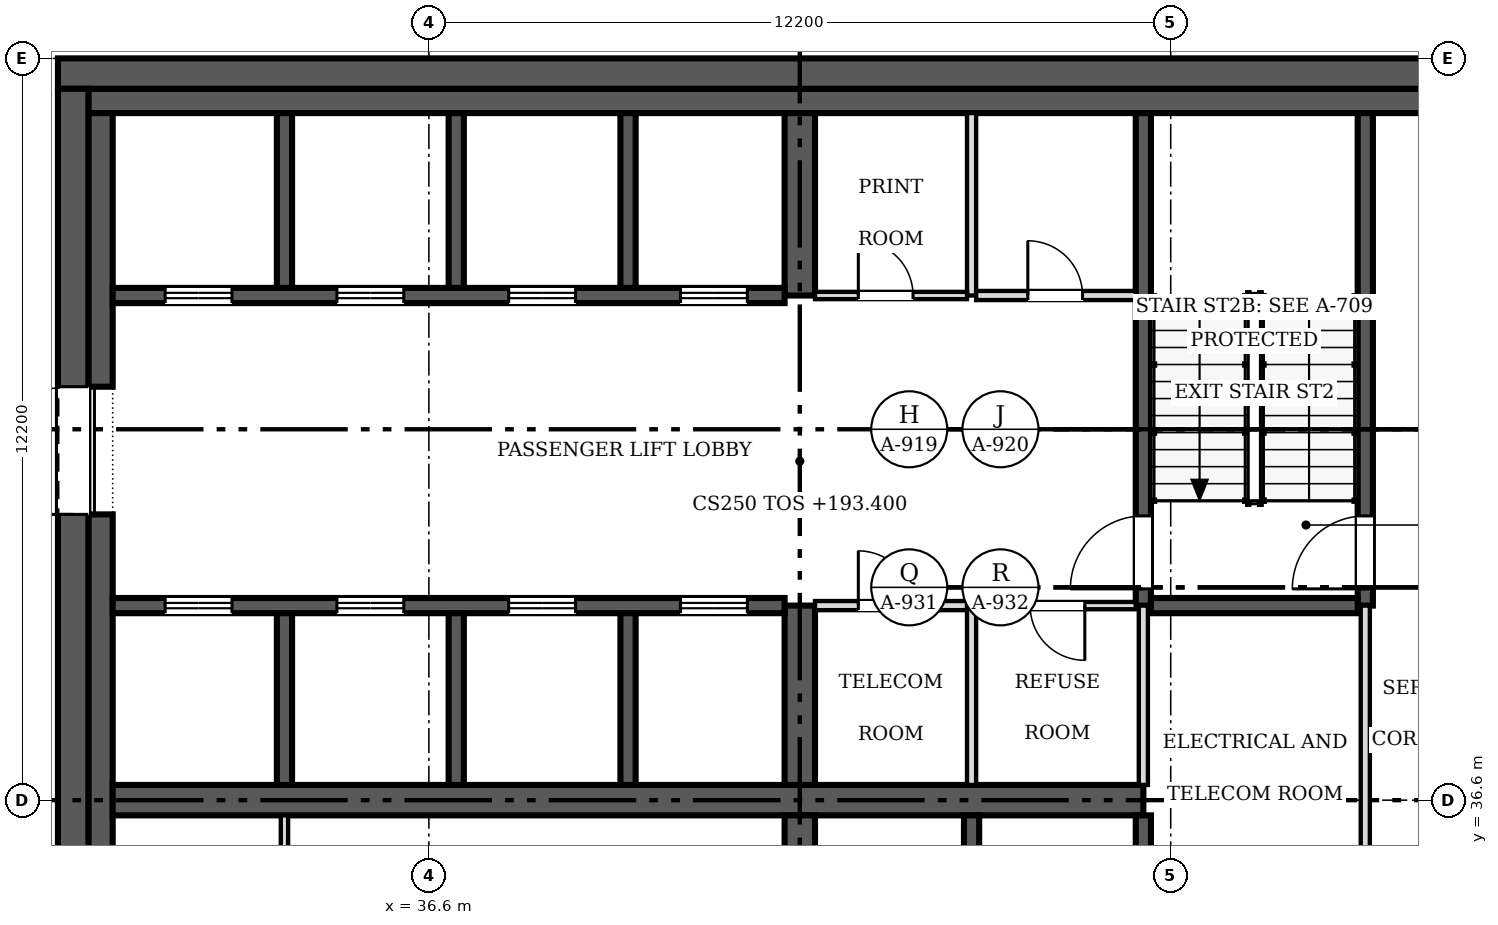
"""IFC4 building model, lengths in metres.
Left out: names, types, materials, properties, quantities, classifications, styles, units other than length and angle.
Written with IfcOpenShell. Run it as: python <this file> out.ifc"""

import sys

from ifc_helpers import new_model, si_unit, direction, frame, frame_2d, origin, place, context, subcontext, project, spatial, rectangle, extrude, source, transform, mapped, element, fill, save


model = new_model("IFC4")
c1 = context("Model", 3, precision=1e-05, world=origin(), true_north=direction((0.0, 1.0)))
c2 = subcontext(c1, "Body", "Model", "MODEL_VIEW")
j1 = project(units=[si_unit("LENGTHUNIT", "METRE"), si_unit("PLANEANGLEUNIT", "RADIAN")], contexts=[c1])
p1 = place(None, origin())
s1 = spatial("IfcSite", under=j1, at=p1, CompositionType="ELEMENT")
p2 = place(p1, origin())
s2 = spatial("IfcBuilding", under=s1, at=p2, CompositionType="ELEMENT")
p3 = place(p2, frame((0.0, 0.0, 193.4)))
s3 = spatial("IfcBuildingStorey", under=s2, at=p3, CompositionType="ELEMENT", Elevation=193.4)
p4 = place(p3, frame((30.75, 24.9, 0.0), z_axis=(0.0, 0.0, 1.0), x_axis=(0.0, 1.0, 0.0)))
e1 = element("IfcWall", 1, at=p4, inside=s3, PredefinedType="SHEAR", context=c2, shape_type="SweptSolid", body=[
    extrude(rectangle(XDim=23.4, YDim=0.5, at=frame_2d((11.7, 0.0))), origin(), (0.0, 0.0, 1.0), 4.5),
])
m1 = source(origin(), c2, "Body", "SweptSolid", [
    extrude(rectangle(XDim=2.1, YDim=2.4, at=frame_2d((1.05, 1.2))), frame((0.0, 0.26, 0.0), z_axis=(0.0, -1.0, 0.0), x_axis=(1.0, 0.0, 0.0)), (0.0, 0.0, 1.0), 0.52),
])
p5 = place(p4, frame((4.9, 0.0, 0.0)))
e2 = element("IfcOpeningElement", 2, at=p5, cuts=e1, PredefinedType="OPENING", context=c2, shape_type="MappedRepresentation", body=[
    mapped(m1, transform((0.0, 0.0, 0.0), scale=1.0)),
])
p6 = place(p4, frame((16.4, 0.0, 0.0)))
e3 = element("IfcOpeningElement", 3, at=p6, cuts=e1, PredefinedType="OPENING", context=c2, shape_type="MappedRepresentation", body=[
    mapped(m1, transform((0.0, 0.0, 0.0), scale=1.0)),
])
p7 = place(p3, frame((30.5, 48.55, 0.0), z_axis=(0.0, 0.0, 1.0), x_axis=(1.0, 0.0, 0.0)))
e4 = element("IfcWall", 4, at=p7, inside=s3, PredefinedType="SHEAR", context=c2, shape_type="SweptSolid", body=[
    extrude(rectangle(XDim=24.4, YDim=0.5, at=frame_2d((12.2, 0.0))), origin(), (0.0, 0.0, 1.0), 4.5),
])
p8 = place(p3, frame((31.0, 48.1, 0.0), z_axis=(0.0, 0.0, 1.0), x_axis=(1.0, 0.0, 0.0)))
e5 = element("IfcWall", 5, at=p8, inside=s3, PredefinedType="SOLIDWALL", context=c2, shape_type="SweptSolid", body=[
    extrude(rectangle(XDim=23.4, YDim=0.4, at=frame_2d((11.7, 0.0))), origin(), (0.0, 0.0, 1.0), 4.5),
])
p9 = place(p3, frame((31.2, 31.9, 0.0), z_axis=(0.0, 0.0, 1.0), x_axis=(0.0, 1.0, 0.0)))
e6 = element("IfcWall", 6, at=p9, inside=s3, PredefinedType="SOLIDWALL", context=c2, shape_type="SweptSolid", body=[
    extrude(rectangle(XDim=9.4, YDim=0.4, at=frame_2d((4.7, 0.0))), origin(), (0.0, 0.0, 1.0), 4.5),
])
p10 = place(p3, frame((31.2, 43.4, 0.0), z_axis=(0.0, 0.0, 1.0), x_axis=(0.0, 1.0, 0.0)))
e7 = element("IfcWall", 7, at=p10, inside=s3, PredefinedType="SOLIDWALL", context=c2, shape_type="SweptSolid", body=[
    extrude(rectangle(XDim=4.5, YDim=0.4, at=frame_2d((2.25, 0.0))), origin(), (0.0, 0.0, 1.0), 4.5),
])
p11 = place(p3, frame((31.4, 36.6, 0.0), z_axis=(0.0, 0.0, 1.0), x_axis=(1.0, 0.0, 0.0)))
e8 = element("IfcWall", 8, at=p11, inside=s3, PredefinedType="SHEAR", context=c2, shape_type="SweptSolid", body=[
    extrude(rectangle(XDim=16.95, YDim=0.5, at=frame_2d((8.475, 0.0))), origin(), (0.0, 0.0, 1.0), 4.5),
])
p12 = place(p3, frame((42.7, 36.35, 0.0), z_axis=(0.0, 0.0, 1.0), x_axis=(0.0, -1.0, 0.0)))
e9 = element("IfcWall", 9, at=p12, inside=s3, PredefinedType="SHEAR", context=c2, shape_type="SweptSolid", body=[
    extrude(rectangle(XDim=11.05, YDim=0.5, at=frame_2d((5.525, 0.0))), origin(), (0.0, 0.0, 1.0), 4.5),
])
m2 = source(origin(), c2, "Body", "SweptSolid", [
    extrude(rectangle(XDim=0.9, YDim=2.1, at=frame_2d((0.45, 1.05))), frame((0.0, 0.26, 0.0), z_axis=(0.0, -1.0, 0.0), x_axis=(1.0, 0.0, 0.0)), (0.0, 0.0, 1.0), 0.52),
])
p13 = place(p12, frame((6.5, 0.0, 0.0)))
e10 = element("IfcOpeningElement", 10, at=p13, cuts=e9, PredefinedType="OPENING", context=c2, shape_type="MappedRepresentation", body=[
    mapped(m2, transform((0.0, 0.0, 0.0), scale=1.0)),
])
m3 = source(origin(), c2, "Body", "SweptSolid", [
    extrude(rectangle(XDim=1.1, YDim=2.1, at=frame_2d((0.55, 1.05))), frame((0.0, 0.26, 0.0), z_axis=(0.0, -1.0, 0.0), x_axis=(1.0, 0.0, 0.0)), (0.0, 0.0, 1.0), 0.52),
])
p14 = place(p12, frame((3.8, 0.0, 0.0)))
e11 = element("IfcOpeningElement", 11, at=p14, cuts=e9, PredefinedType="OPENING", context=c2, shape_type="MappedRepresentation", body=[
    mapped(m3, transform((0.0, 0.0, 0.0), scale=1.0)),
])
p15 = place(p3, frame((42.7, 36.85, 0.0), z_axis=(0.0, 0.0, 1.0), x_axis=(0.0, 1.0, 0.0)))
e12 = element("IfcWall", 12, at=p15, inside=s3, PredefinedType="SHEAR", context=c2, shape_type="SweptSolid", body=[
    extrude(rectangle(XDim=2.95, YDim=0.5, at=frame_2d((1.475, 0.0))), origin(), (0.0, 0.0, 1.0), 4.5),
])
p16 = place(p3, frame((42.7, 44.9, 0.0), z_axis=(0.0, 0.0, 1.0), x_axis=(0.0, 1.0, 0.0)))
e13 = element("IfcWall", 13, at=p16, inside=s3, PredefinedType="SHEAR", context=c2, shape_type="SweptSolid", body=[
    extrude(rectangle(XDim=3.0, YDim=0.5, at=frame_2d((1.5, 0.0))), origin(), (0.0, 0.0, 1.0), 4.5),
])
p17 = place(p3, frame((31.4, 39.8, 0.0), z_axis=(0.0, 0.0, 1.0), x_axis=(1.0, 0.0, 0.0)))
e14 = element("IfcWall", 14, at=p17, inside=s3, PredefinedType="SOLIDWALL", context=c2, shape_type="SweptSolid", body=[
    extrude(rectangle(XDim=11.05, YDim=0.25, at=frame_2d((5.525, 0.0))), origin(), (0.0, 0.0, 1.0), 4.5),
])
m4 = source(origin(), c2, "Body", "SweptSolid", [
    extrude(rectangle(XDim=1.1, YDim=2.1, at=frame_2d((0.55, 1.05))), frame((0.0, 0.135, 0.0), z_axis=(0.0, -1.0, 0.0), x_axis=(1.0, 0.0, 0.0)), (0.0, 0.0, 1.0), 0.27),
])
p18 = place(p17, frame((0.863, 0.0, 0.0)))
e15 = element("IfcOpeningElement", 15, at=p18, cuts=e14, PredefinedType="OPENING", context=c2, shape_type="MappedRepresentation", body=[
    mapped(m4, transform((0.0, 0.0, 0.0), scale=1.0)),
])
p19 = place(p17, frame((3.688, 0.0, 0.0)))
e16 = element("IfcOpeningElement", 16, at=p19, cuts=e14, PredefinedType="OPENING", context=c2, shape_type="MappedRepresentation", body=[
    mapped(m4, transform((0.0, 0.0, 0.0), scale=1.0)),
])
p20 = place(p17, frame((6.512, 0.0, 0.0)))
e17 = element("IfcOpeningElement", 17, at=p20, cuts=e14, PredefinedType="OPENING", context=c2, shape_type="MappedRepresentation", body=[
    mapped(m4, transform((0.0, 0.0, 0.0), scale=1.0)),
])
p21 = place(p17, frame((9.337, 0.0, 0.0)))
e18 = element("IfcOpeningElement", 18, at=p21, cuts=e14, PredefinedType="OPENING", context=c2, shape_type="MappedRepresentation", body=[
    mapped(m4, transform((0.0, 0.0, 0.0), scale=1.0)),
])
p22 = place(p3, frame((42.45, 44.9, 0.0), z_axis=(0.0, 0.0, 1.0), x_axis=(-1.0, 0.0, 0.0)))
e19 = element("IfcWall", 19, at=p22, inside=s3, PredefinedType="SOLIDWALL", context=c2, shape_type="SweptSolid", body=[
    extrude(rectangle(XDim=11.05, YDim=0.25, at=frame_2d((5.525, 0.0))), origin(), (0.0, 0.0, 1.0), 4.5),
])
p23 = place(p22, frame((9.087, 0.0, 0.0)))
e20 = element("IfcOpeningElement", 20, at=p23, cuts=e19, PredefinedType="OPENING", context=c2, shape_type="MappedRepresentation", body=[
    mapped(m4, transform((0.0, 0.0, 0.0), scale=1.0)),
])
p24 = place(p22, frame((6.262, 0.0, 0.0)))
e21 = element("IfcOpeningElement", 21, at=p24, cuts=e19, PredefinedType="OPENING", context=c2, shape_type="MappedRepresentation", body=[
    mapped(m4, transform((0.0, 0.0, 0.0), scale=1.0)),
])
p25 = place(p22, frame((3.438, 0.0, 0.0)))
e22 = element("IfcOpeningElement", 22, at=p25, cuts=e19, PredefinedType="OPENING", context=c2, shape_type="MappedRepresentation", body=[
    mapped(m4, transform((0.0, 0.0, 0.0), scale=1.0)),
])
p26 = place(p22, frame((0.613, 0.0, 0.0)))
e23 = element("IfcOpeningElement", 23, at=p26, cuts=e19, PredefinedType="OPENING", context=c2, shape_type="MappedRepresentation", body=[
    mapped(m4, transform((0.0, 0.0, 0.0), scale=1.0)),
])
p27 = place(p3, frame((48.35, 36.35, 0.0), z_axis=(0.0, 0.0, 1.0), x_axis=(0.0, -1.0, 0.0)))
e24 = element("IfcWall", 24, at=p27, inside=s3, PredefinedType="SOLIDWALL", context=c2, shape_type="SweptSolid", body=[
    extrude(rectangle(XDim=11.05, YDim=0.25, at=frame_2d((5.525, 0.0))), origin(), (0.0, 0.0, 1.0), 4.5),
])
m5 = source(origin(), c2, "Body", "SweptSolid", [
    extrude(rectangle(XDim=1.2, YDim=2.1, at=frame_2d((0.6, 1.05))), frame((0.0, 0.135, 0.0), z_axis=(0.0, -1.0, 0.0), x_axis=(1.0, 0.0, 0.0)), (0.0, 0.0, 1.0), 0.27),
])
p28 = place(p27, frame((3.225, 0.0, 0.0)))
e25 = element("IfcOpeningElement", 25, at=p28, cuts=e24, PredefinedType="OPENING", context=c2, shape_type="MappedRepresentation", body=[
    mapped(m5, transform((0.0, 0.0, 0.0), scale=1.0)),
])
p29 = place(p3, frame((48.35, 47.9, 0.0), z_axis=(0.0, 0.0, 1.0), x_axis=(0.0, -1.0, 0.0)))
e26 = element("IfcWall", 26, at=p29, inside=s3, PredefinedType="SOLIDWALL", context=c2, shape_type="SweptSolid", body=[
    extrude(rectangle(XDim=8.1, YDim=0.25, at=frame_2d((4.05, 0.0))), origin(), (0.0, 0.0, 1.0), 4.5),
])
p30 = place(p29, frame((6.625, 0.0, 0.0)))
e27 = element("IfcOpeningElement", 27, at=p30, cuts=e26, PredefinedType="OPENING", context=c2, shape_type="MappedRepresentation", body=[
    mapped(m5, transform((0.0, 0.0, 0.0), scale=1.0)),
])
p31 = place(p3, frame((52.0, 39.8, 0.0), z_axis=(0.0, 0.0, 1.0), x_axis=(0.0, 1.0, 0.0)))
e28 = element("IfcWall", 28, at=p31, inside=s3, PredefinedType="SOLIDWALL", context=c2, shape_type="SweptSolid", body=[
    extrude(rectangle(XDim=8.1, YDim=0.25, at=frame_2d((4.05, 0.0))), origin(), (0.0, 0.0, 1.0), 4.5),
])
p32 = place(p31, frame((0.275, 0.0, 0.0)))
e29 = element("IfcOpeningElement", 29, at=p32, cuts=e28, PredefinedType="OPENING", context=c2, shape_type="MappedRepresentation", body=[
    mapped(m5, transform((0.0, 0.0, 0.0), scale=1.0)),
])
p33 = place(p3, frame((48.475, 39.8, 0.0), z_axis=(0.0, 0.0, 1.0), x_axis=(1.0, 0.0, 0.0)))
e30 = element("IfcWall", 30, at=p33, inside=s3, PredefinedType="SOLIDWALL", context=c2, shape_type="SweptSolid", body=[
    extrude(rectangle(XDim=3.4, YDim=0.25, at=frame_2d((1.7, 0.0))), origin(), (0.0, 0.0, 1.0), 4.5),
])
for number, where, z_axis, x_axis in (
    (31, (34.225, 36.85, 0.0), (0.0, 0.0, 1.0), (0.0, 1.0, 0.0)),
    (32, (37.05, 36.85, 0.0), (0.0, 0.0, 1.0), (0.0, 1.0, 0.0)),
    (33, (39.875, 36.85, 0.0), (0.0, 0.0, 1.0), (0.0, 1.0, 0.0)),
):
    element("IfcWall", number, at=place(p3, frame(where, z_axis=z_axis, x_axis=x_axis)), inside=s3, PredefinedType="SOLIDWALL", context=c2, shape_type="SweptSolid", body=[
        extrude(rectangle(XDim=2.825, YDim=0.25, at=frame_2d((1.413, 0.0))), origin(), (0.0, 0.0, 1.0), 4.5),
    ])
p34 = place(p3, frame((45.525, 33.525, 0.0), z_axis=(0.0, 0.0, 1.0), x_axis=(0.0, 1.0, 0.0)))
e34 = element("IfcWall", 34, at=p34, inside=s3, PredefinedType="SOLIDWALL", context=c2, shape_type="SweptSolid", body=[
    extrude(rectangle(XDim=2.825, YDim=0.25, at=frame_2d((1.413, 0.0))), origin(), (0.0, 0.0, 1.0), 4.5),
])
for number, where, z_axis, x_axis in (
    (35, (34.225, 45.025, 0.0), (0.0, 0.0, 1.0), (0.0, 1.0, 0.0)),
    (36, (37.05, 45.025, 0.0), (0.0, 0.0, 1.0), (0.0, 1.0, 0.0)),
    (37, (39.875, 45.025, 0.0), (0.0, 0.0, 1.0), (0.0, 1.0, 0.0)),
):
    element("IfcWall", number, at=place(p3, frame(where, z_axis=z_axis, x_axis=x_axis)), inside=s3, PredefinedType="SOLIDWALL", context=c2, shape_type="SweptSolid", body=[
        extrude(rectangle(XDim=2.875, YDim=0.25, at=frame_2d((1.438, 0.0))), origin(), (0.0, 0.0, 1.0), 4.5),
    ])
p35 = place(p3, frame((52.0, 33.525, 0.0), z_axis=(0.0, 0.0, 1.0), x_axis=(0.0, 1.0, 0.0)))
e38 = element("IfcWall", 38, at=p35, inside=s3, PredefinedType="PARTITIONING", context=c2, shape_type="SweptSolid", body=[
    extrude(rectangle(XDim=6.275, YDim=0.15, at=frame_2d((3.138, 0.0))), origin(), (0.0, 0.0, 1.0), 4.3),
])
m6 = source(origin(), c2, "Body", "SweptSolid", [
    extrude(rectangle(XDim=0.9, YDim=2.1, at=frame_2d((0.45, 1.05))), frame((0.0, 0.085, 0.0), z_axis=(0.0, -1.0, 0.0), x_axis=(1.0, 0.0, 0.0)), (0.0, 0.0, 1.0), 0.17),
])
p36 = place(p35, frame((1.025, 0.0, 0.0)))
e39 = element("IfcOpeningElement", 39, at=p36, cuts=e38, PredefinedType="OPENING", context=c2, shape_type="MappedRepresentation", body=[
    mapped(m6, transform((0.0, 0.0, 0.0), scale=1.0)),
])
for number, where, z_axis, x_axis in (
    (40, (45.525, 36.85, 0.0), (0.0, 0.0, 1.0), (0.0, 1.0, 0.0)),
    (41, (48.35, 36.85, 0.0), (0.0, 0.0, 1.0), (0.0, 1.0, 0.0)),
):
    element("IfcWall", number, at=place(p3, frame(where, z_axis=z_axis, x_axis=x_axis)), inside=s3, PredefinedType="PARTITIONING", context=c2, shape_type="SweptSolid", body=[
        extrude(rectangle(XDim=2.95, YDim=0.15, at=frame_2d((1.475, 0.0))), origin(), (0.0, 0.0, 1.0), 4.3),
    ])
p37 = place(p3, frame((34.225, 33.46, 0.0), z_axis=(0.0, 0.0, 1.0), x_axis=(0.0, 1.0, 0.0)))
e42 = element("IfcWall", 42, at=p37, inside=s3, PredefinedType="PARTITIONING", context=c2, shape_type="SweptSolid", body=[
    extrude(rectangle(XDim=2.89, YDim=0.12, at=frame_2d((1.445, 0.0))), origin(), (0.0, 0.0, 1.0), 4.3),
])
p38 = place(p3, frame((45.525, 44.9, 0.0), z_axis=(0.0, 0.0, 1.0), x_axis=(0.0, 1.0, 0.0)))
e43 = element("IfcWall", 43, at=p38, inside=s3, PredefinedType="PARTITIONING", context=c2, shape_type="SweptSolid", body=[
    extrude(rectangle(XDim=3.0, YDim=0.15, at=frame_2d((1.5, 0.0))), origin(), (0.0, 0.0, 1.0), 4.3),
])
p39 = place(p3, frame((45.45, 39.8, 0.0), z_axis=(0.0, 0.0, 1.0), x_axis=(-1.0, 0.0, 0.0)))
e44 = element("IfcWall", 44, at=p39, inside=s3, PredefinedType="PARTITIONING", context=c2, shape_type="SweptSolid", body=[
    extrude(rectangle(XDim=2.5, YDim=0.15, at=frame_2d((1.25, 0.0))), origin(), (0.0, 0.0, 1.0), 4.3),
])
p40 = place(p39, frame((0.887, 0.0, 0.0)))
e45 = element("IfcOpeningElement", 45, at=p40, cuts=e44, PredefinedType="OPENING", context=c2, shape_type="MappedRepresentation", body=[
    mapped(m6, transform((0.0, 0.0, 0.0), scale=1.0)),
])
p41 = place(p3, frame((48.225, 39.8, 0.0), z_axis=(0.0, 0.0, 1.0), x_axis=(-1.0, 0.0, 0.0)))
e46 = element("IfcWall", 46, at=p41, inside=s3, PredefinedType="PARTITIONING", context=c2, shape_type="SweptSolid", body=[
    extrude(rectangle(XDim=2.625, YDim=0.12, at=frame_2d((1.312, 0.0))), origin(), (0.0, 0.0, 1.0), 4.3),
])
m7 = source(origin(), c2, "Body", "SweptSolid", [
    extrude(rectangle(XDim=0.9, YDim=2.1, at=frame_2d((0.45, 1.05))), frame((0.0, 0.07, 0.0), z_axis=(0.0, -1.0, 0.0), x_axis=(1.0, 0.0, 0.0)), (0.0, 0.0, 1.0), 0.14),
])
p42 = place(p41, frame((0.837, 0.0, 0.0)))
e47 = element("IfcOpeningElement", 47, at=p42, cuts=e46, PredefinedType="OPENING", context=c2, shape_type="MappedRepresentation", body=[
    mapped(m7, transform((0.0, 0.0, 0.0), scale=1.0)),
])
p43 = place(p3, frame((42.95, 44.9, 0.0), z_axis=(0.0, 0.0, 1.0), x_axis=(1.0, 0.0, 0.0)))
e48 = element("IfcWall", 48, at=p43, inside=s3, PredefinedType="PARTITIONING", context=c2, shape_type="SweptSolid", body=[
    extrude(rectangle(XDim=2.5, YDim=0.12, at=frame_2d((1.25, 0.0))), origin(), (0.0, 0.0, 1.0), 4.3),
])
p44 = place(p43, frame((0.712, 0.0, 0.0)))
e49 = element("IfcOpeningElement", 49, at=p44, cuts=e48, PredefinedType="OPENING", context=c2, shape_type="MappedRepresentation", body=[
    mapped(m7, transform((0.0, 0.0, 0.0), scale=1.0)),
])
p45 = place(p3, frame((45.6, 44.9, 0.0), z_axis=(0.0, 0.0, 1.0), x_axis=(1.0, 0.0, 0.0)))
e50 = element("IfcWall", 50, at=p45, inside=s3, PredefinedType="PARTITIONING", context=c2, shape_type="SweptSolid", body=[
    extrude(rectangle(XDim=2.625, YDim=0.15, at=frame_2d((1.312, 0.0))), origin(), (0.0, 0.0, 1.0), 4.3),
])
p46 = place(p45, frame((0.85, 0.0, 0.0)))
e51 = element("IfcOpeningElement", 51, at=p46, cuts=e50, PredefinedType="OPENING", context=c2, shape_type="MappedRepresentation", body=[
    mapped(m6, transform((0.0, 0.0, 0.0), scale=1.0)),
])
m8 = source(origin(), c2, "Body", "SweptSolid", [
    extrude(rectangle(XDim=2.1, YDim=2.4, at=frame_2d((1.05, 1.2))), frame((0.0, 0.025, 0.0), z_axis=(0.0, -1.0, 0.0), x_axis=(1.0, 0.0, 0.0)), (0.0, 0.0, 1.0), 0.05),
])
p47 = place(p6, origin())
e52 = element("IfcDoor", 52, at=p47, inside=s3, OperationType="DOUBLE_DOOR_SINGLE_SWING", PredefinedType="DOOR", context=c2, shape_type="MappedRepresentation", body=[
    mapped(m8, transform((0.0, 0.0, 0.0), scale=1.0)),
])
fill(e3, e52)
m9 = source(origin(), c2, "Body", "SweptSolid", [
    extrude(rectangle(XDim=1.1, YDim=2.1, at=frame_2d((0.55, 1.05))), frame((0.0, 0.025, 0.0), z_axis=(0.0, -1.0, 0.0), x_axis=(1.0, 0.0, 0.0)), (0.0, 0.0, 1.0), 0.05),
])
p48 = place(p18, origin())
e53 = element("IfcDoor", 53, at=p48, inside=s3, OperationType="DOUBLE_DOOR_SLIDING", PredefinedType="DOOR", context=c2, shape_type="MappedRepresentation", body=[
    mapped(m9, transform((0.0, 0.0, 0.0), scale=1.0)),
])
fill(e15, e53)
p49 = place(p19, origin())
e54 = element("IfcDoor", 54, at=p49, inside=s3, OperationType="DOUBLE_DOOR_SLIDING", PredefinedType="DOOR", context=c2, shape_type="MappedRepresentation", body=[
    mapped(m9, transform((0.0, 0.0, 0.0), scale=1.0)),
])
fill(e16, e54)
p50 = place(p20, origin())
e55 = element("IfcDoor", 55, at=p50, inside=s3, OperationType="DOUBLE_DOOR_SLIDING", PredefinedType="DOOR", context=c2, shape_type="MappedRepresentation", body=[
    mapped(m9, transform((0.0, 0.0, 0.0), scale=1.0)),
])
fill(e17, e55)
p51 = place(p21, origin())
e56 = element("IfcDoor", 56, at=p51, inside=s3, OperationType="DOUBLE_DOOR_SLIDING", PredefinedType="DOOR", context=c2, shape_type="MappedRepresentation", body=[
    mapped(m9, transform((0.0, 0.0, 0.0), scale=1.0)),
])
fill(e18, e56)
p52 = place(p23, origin())
e57 = element("IfcDoor", 57, at=p52, inside=s3, OperationType="DOUBLE_DOOR_SLIDING", PredefinedType="DOOR", context=c2, shape_type="MappedRepresentation", body=[
    mapped(m9, transform((0.0, 0.0, 0.0), scale=1.0)),
])
fill(e20, e57)
p53 = place(p24, origin())
e58 = element("IfcDoor", 58, at=p53, inside=s3, OperationType="DOUBLE_DOOR_SLIDING", PredefinedType="DOOR", context=c2, shape_type="MappedRepresentation", body=[
    mapped(m9, transform((0.0, 0.0, 0.0), scale=1.0)),
])
fill(e21, e58)
p54 = place(p25, origin())
e59 = element("IfcDoor", 59, at=p54, inside=s3, OperationType="DOUBLE_DOOR_SLIDING", PredefinedType="DOOR", context=c2, shape_type="MappedRepresentation", body=[
    mapped(m9, transform((0.0, 0.0, 0.0), scale=1.0)),
])
fill(e22, e59)
p55 = place(p26, origin())
e60 = element("IfcDoor", 60, at=p55, inside=s3, OperationType="DOUBLE_DOOR_SLIDING", PredefinedType="DOOR", context=c2, shape_type="MappedRepresentation", body=[
    mapped(m9, transform((0.0, 0.0, 0.0), scale=1.0)),
])
fill(e23, e60)
m10 = source(origin(), c2, "Body", "SweptSolid", [
    extrude(rectangle(XDim=1.2, YDim=2.1, at=frame_2d((0.6, 1.05))), frame((0.0, 0.025, 0.0), z_axis=(0.0, -1.0, 0.0), x_axis=(1.0, 0.0, 0.0)), (0.0, 0.0, 1.0), 0.05),
])
p56 = place(p30, origin())
e61 = element("IfcDoor", 61, at=p56, inside=s3, OperationType="SINGLE_SWING_RIGHT", PredefinedType="DOOR", context=c2, shape_type="MappedRepresentation", body=[
    mapped(m10, transform((0.0, 0.0, 0.0), scale=1.0)),
])
fill(e27, e61)
p57 = place(p32, origin())
e62 = element("IfcDoor", 62, at=p57, inside=s3, OperationType="SINGLE_SWING_LEFT", PredefinedType="DOOR", context=c2, shape_type="MappedRepresentation", body=[
    mapped(m10, transform((0.0, 0.0, 0.0), scale=1.0)),
])
fill(e29, e62)
m11 = source(origin(), c2, "Body", "SweptSolid", [
    extrude(rectangle(XDim=0.9, YDim=2.1, at=frame_2d((0.45, 1.05))), frame((0.0, 0.025, 0.0), z_axis=(0.0, -1.0, 0.0), x_axis=(1.0, 0.0, 0.0)), (0.0, 0.0, 1.0), 0.05),
])
p58 = place(p40, origin())
e63 = element("IfcDoor", 63, at=p58, inside=s3, OperationType="SINGLE_SWING_RIGHT", PredefinedType="DOOR", context=c2, shape_type="MappedRepresentation", body=[
    mapped(m11, transform((0.0, 0.0, 0.0), scale=1.0)),
])
fill(e45, e63)
p59 = place(p42, origin())
e64 = element("IfcDoor", 64, at=p59, inside=s3, OperationType="SINGLE_SWING_LEFT", PredefinedType="DOOR", context=c2, shape_type="MappedRepresentation", body=[
    mapped(m11, transform((0.0, 0.0, 0.0), scale=1.0)),
])
fill(e47, e64)
p60 = place(p44, origin())
e65 = element("IfcDoor", 65, at=p60, inside=s3, OperationType="SINGLE_SWING_LEFT", PredefinedType="DOOR", context=c2, shape_type="MappedRepresentation", body=[
    mapped(m11, transform((0.0, 0.0, 0.0), scale=1.0)),
])
fill(e49, e65)
p61 = place(p46, origin())
e66 = element("IfcDoor", 66, at=p61, inside=s3, OperationType="SINGLE_SWING_LEFT", PredefinedType="DOOR", context=c2, shape_type="MappedRepresentation", body=[
    mapped(m11, transform((0.0, 0.0, 0.0), scale=1.0)),
])
fill(e51, e66)
save(model, sys.argv[1])
